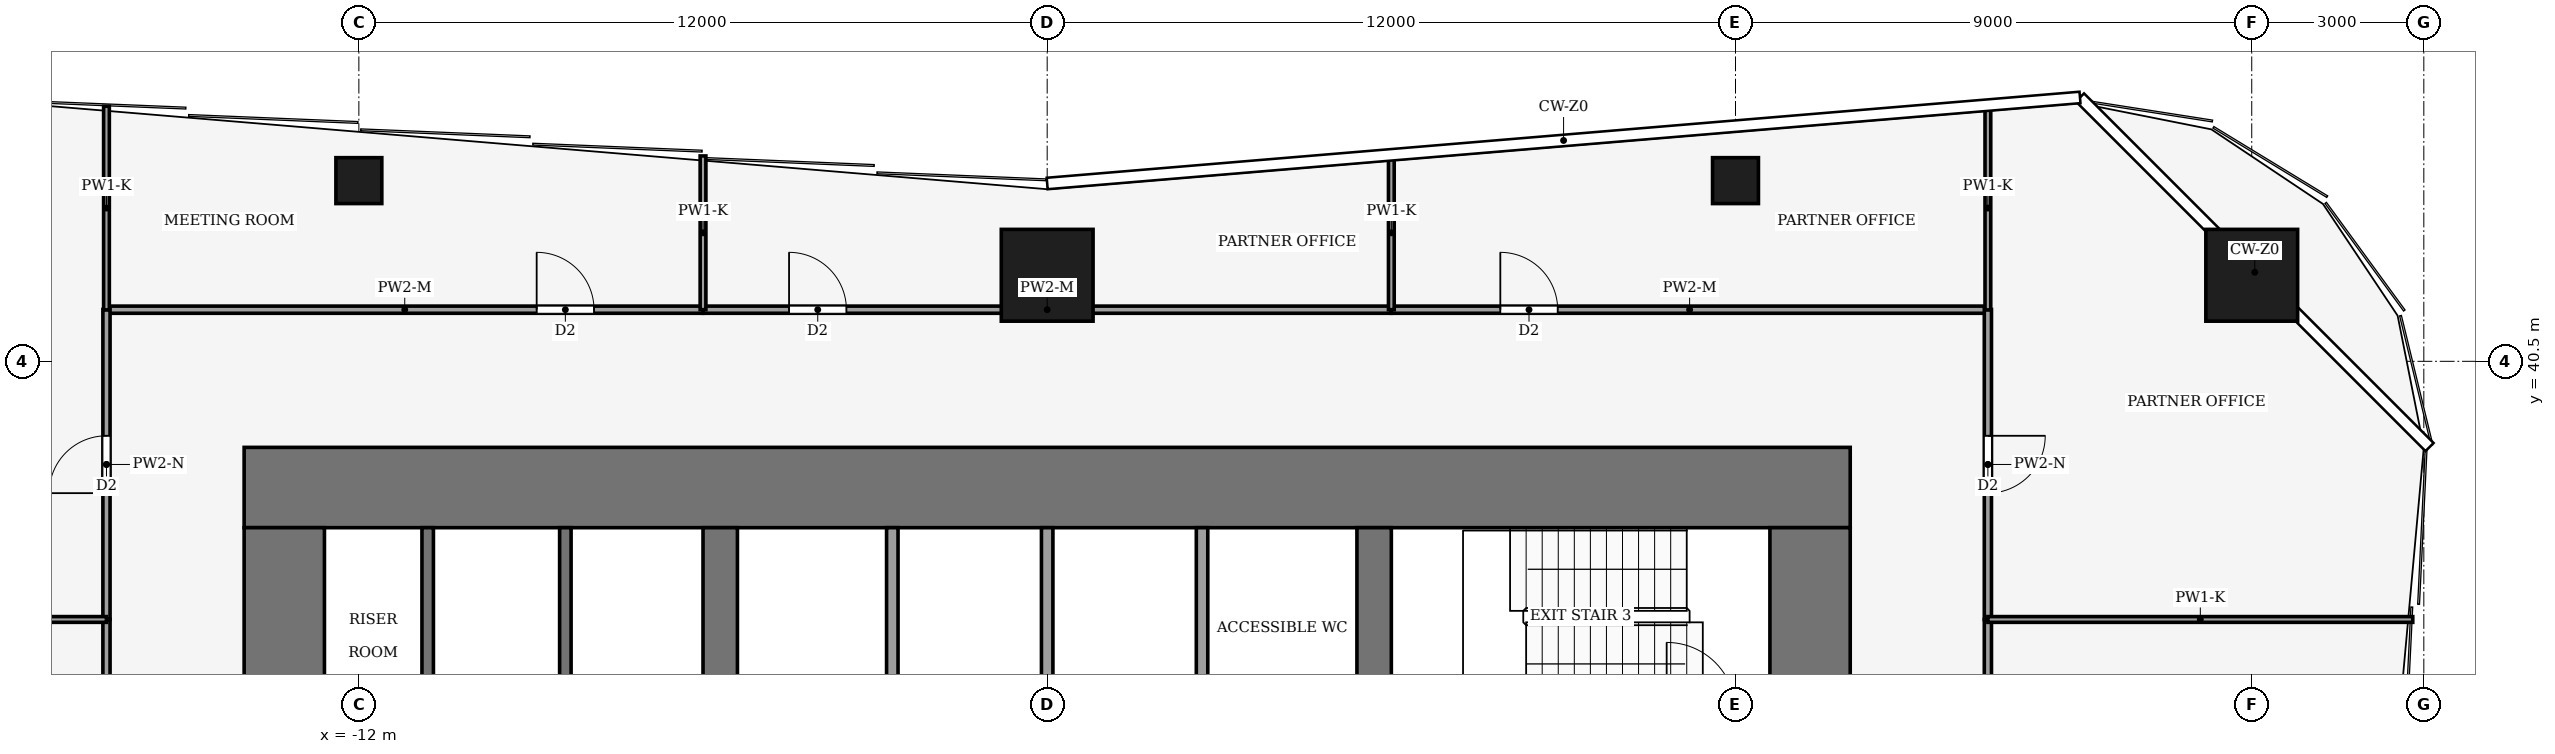
"""IFC4 building model, lengths in metres.
Left out: names, types, materials, properties, quantities, classifications, styles, units other than length and angle.
Written with IfcOpenShell. Run it as: python <this file> out.ifc"""

import sys

from ifc_helpers import new_model, si_unit, direction, frame, frame_2d, origin, origin_2d, place, context, subcontext, project, spatial, rectangle, hollow_rectangle, extrude, element, fill, save


model = new_model("IFC4")
c1 = context("Model", 3, precision=1e-05, world=origin(), true_north=direction((0.0, 1.0)))
c2 = subcontext(c1, "Body", "Model", "MODEL_VIEW")
j1 = project(units=[si_unit("LENGTHUNIT", "METRE"), si_unit("PLANEANGLEUNIT", "RADIAN")], contexts=[c1])
p1 = place(None, origin())
s1 = spatial("IfcSite", under=j1, at=p1, CompositionType="ELEMENT")
p2 = place(p1, origin())
s2 = spatial("IfcBuilding", under=s1, at=p2, CompositionType="ELEMENT")
p3 = place(p2, frame((0.0, 0.0, 54.0)))
s3 = spatial("IfcBuildingStorey", under=s2, at=p3, CompositionType="ELEMENT", Elevation=54.0)
p4 = place(p3, frame((-14.0, 38.3, -0.13), z_axis=(0.0, 0.0, 1.0), x_axis=(1.0, 0.0, 0.0)))
e1 = element("IfcWall", 1, at=p4, inside=s3, PredefinedType="SHEAR", context=c2, shape_type="SweptSolid", body=[
    extrude(rectangle(XDim=28.0, YDim=1.4, at=frame_2d((14.0, 0.0))), origin(), (0.0, 0.0, 1.0), 3.88),
])
p5 = place(p3, frame((-13.3, 18.4, -0.13), z_axis=(0.0, 0.0, 1.0), x_axis=(0.0, 1.0, 0.0)))
e2 = element("IfcWall", 2, at=p5, inside=s3, PredefinedType="SHEAR", context=c2, shape_type="SweptSolid", body=[
    extrude(rectangle(XDim=19.2, YDim=1.4, at=frame_2d((9.6, 0.0))), origin(), (0.0, 0.0, 1.0), 3.88),
])
p6 = place(p5, frame((2.8, 0.0, 0.13)))
e3 = element("IfcOpeningElement", 3, at=p6, cuts=e2, PredefinedType="OPENING", context=c2, shape_type="SweptSolid", body=[
    extrude(rectangle(XDim=2.4, YDim=2.4, at=frame_2d((1.2, 1.2))), frame((0.0, 0.71, 0.0), z_axis=(0.0, -1.0, 0.0), x_axis=(1.0, 0.0, 0.0)), (0.0, 0.0, 1.0), 1.42),
])
p7 = place(p5, frame((13.4, 0.0, 0.13)))
e4 = element("IfcOpeningElement", 4, at=p7, cuts=e2, PredefinedType="OPENING", context=c2, shape_type="SweptSolid", body=[
    extrude(rectangle(XDim=1.4, YDim=2.2, at=frame_2d((0.7, 1.1))), frame((0.0, 0.71, 0.0), z_axis=(0.0, -1.0, 0.0), x_axis=(1.0, 0.0, 0.0)), (0.0, 0.0, 1.0), 1.42),
])
p8 = place(p3, frame((13.3, 18.4, -0.13), z_axis=(0.0, 0.0, 1.0), x_axis=(0.0, 1.0, 0.0)))
e5 = element("IfcWall", 5, at=p8, inside=s3, PredefinedType="SHEAR", context=c2, shape_type="SweptSolid", body=[
    extrude(rectangle(XDim=19.2, YDim=1.4, at=frame_2d((9.6, 0.0))), origin(), (0.0, 0.0, 1.0), 3.88),
])
p9 = place(p8, frame((2.8, 0.0, 0.13)))
e6 = element("IfcOpeningElement", 6, at=p9, cuts=e5, PredefinedType="OPENING", context=c2, shape_type="SweptSolid", body=[
    extrude(rectangle(XDim=2.4, YDim=2.4, at=frame_2d((1.2, 1.2))), frame((0.0, 0.71, 0.0), z_axis=(0.0, -1.0, 0.0), x_axis=(1.0, 0.0, 0.0)), (0.0, 0.0, 1.0), 1.42),
])
p10 = place(p8, frame((13.3, 0.0, 0.13)))
e7 = element("IfcOpeningElement", 7, at=p10, cuts=e5, PredefinedType="OPENING", context=c2, shape_type="SweptSolid", body=[
    extrude(rectangle(XDim=2.4, YDim=2.4, at=frame_2d((1.2, 1.2))), frame((0.0, 0.71, 0.0), z_axis=(0.0, -1.0, 0.0), x_axis=(1.0, 0.0, 0.0)), (0.0, 0.0, 1.0), 1.42),
])
p11 = place(p3, frame((-5.7, 18.4, -0.13), z_axis=(0.0, 0.0, 1.0), x_axis=(0.0, 1.0, 0.0)))
e8 = element("IfcWall", 8, at=p11, inside=s3, PredefinedType="SHEAR", context=c2, shape_type="SweptSolid", body=[
    extrude(rectangle(XDim=19.2, YDim=0.6, at=frame_2d((9.6, 0.0))), origin(), (0.0, 0.0, 1.0), 3.88),
])
p12 = place(p11, frame((8.35, 0.0, 0.13)))
e9 = element("IfcOpeningElement", 9, at=p12, cuts=e8, PredefinedType="OPENING", context=c2, shape_type="SweptSolid", body=[
    extrude(rectangle(XDim=0.9, YDim=2.1, at=frame_2d((0.45, 1.05))), frame((0.0, 0.31, 0.0), z_axis=(0.0, -1.0, 0.0), x_axis=(1.0, 0.0, 0.0)), (0.0, 0.0, 1.0), 0.62),
])
p13 = place(p3, frame((5.7, 18.4, -0.13), z_axis=(0.0, 0.0, 1.0), x_axis=(0.0, 1.0, 0.0)))
e10 = element("IfcWall", 10, at=p13, inside=s3, PredefinedType="SHEAR", context=c2, shape_type="SweptSolid", body=[
    extrude(rectangle(XDim=19.2, YDim=0.6, at=frame_2d((9.6, 0.0))), origin(), (0.0, 0.0, 1.0), 3.88),
])
p14 = place(p13, frame((8.35, 0.0, 0.13)))
e11 = element("IfcOpeningElement", 11, at=p14, cuts=e10, PredefinedType="OPENING", context=c2, shape_type="SweptSolid", body=[
    extrude(rectangle(XDim=0.9, YDim=2.1, at=frame_2d((0.45, 1.05))), frame((0.0, 0.31, 0.0), z_axis=(0.0, -1.0, 0.0), x_axis=(1.0, 0.0, 0.0)), (0.0, 0.0, 1.0), 0.62),
])
p15 = place(p13, frame((13.3, 0.0, 0.13)))
e12 = element("IfcOpeningElement", 12, at=p15, cuts=e10, PredefinedType="OPENING", context=c2, shape_type="SweptSolid", body=[
    extrude(rectangle(XDim=2.4, YDim=2.4, at=frame_2d((1.2, 1.2))), frame((0.0, 0.31, 0.0), z_axis=(0.0, -1.0, 0.0), x_axis=(1.0, 0.0, 0.0)), (0.0, 0.0, 1.0), 0.62),
])
for number, where, z_axis, x_axis in (
    (13, (0.0, 42.0, 0.0), (0.0, 0.0, 1.0), (1.0, 0.0, 0.0)),
    (14, (21.0, 42.0, 0.0), (0.0, 0.0, 1.0), (1.0, 0.0, 0.0)),
):
    element("IfcColumn", number, at=place(p3, frame(where, z_axis=z_axis, x_axis=x_axis)), inside=s3, PredefinedType="COLUMN", context=c2, shape_type="SweptSolid", body=[
        extrude(hollow_rectangle(XDim=1.6, YDim=1.6, WallThickness=0.09, at=origin_2d()), origin(), (0.0, 0.0, 1.0), 4.0),
    ])
for number, where, z_axis, x_axis in (
    (15, (-12.0, 43.65, 0.0), (0.0, 0.0, 1.0), (1.0, 0.0, 0.0)),
    (16, (12.0, 43.65, 0.0), (0.0, 0.0, 1.0), (1.0, 0.0, 0.0)),
):
    element("IfcColumn", number, at=place(p3, frame(where, z_axis=z_axis, x_axis=x_axis)), inside=s3, PredefinedType="COLUMN", context=c2, shape_type="SweptSolid", body=[
        extrude(hollow_rectangle(XDim=0.8, YDim=0.8, WallThickness=0.04, at=origin_2d()), origin(), (0.0, 0.0, 1.0), 4.0),
    ])
for number, where, z_axis, x_axis in (
    (17, (-10.8, 34.0, 0.0), (0.0, 0.0, 1.0), (0.0, 1.0, 0.0)),
    (18, (-8.4, 34.0, 0.0), (0.0, 0.0, 1.0), (0.0, 1.0, 0.0)),
    (19, (-2.7, 34.0, 0.0), (0.0, 0.0, 1.0), (0.0, 1.0, 0.0)),
    (20, (0.0, 34.0, 0.0), (0.0, 0.0, 1.0), (0.0, 1.0, 0.0)),
    (21, (2.7, 34.0, 0.0), (0.0, 0.0, 1.0), (0.0, 1.0, 0.0)),
):
    element("IfcWall", number, at=place(p3, frame(where, z_axis=z_axis, x_axis=x_axis)), inside=s3, PredefinedType="PARTITIONING", context=c2, shape_type="SweptSolid", body=[
        extrude(rectangle(XDim=3.6, YDim=0.2, at=frame_2d((1.8, 0.0))), origin(), (0.0, 0.0, 1.0), 3.75),
    ])
p16 = place(p3, frame((-16.4, 41.4, 0.0), z_axis=(0.0, 0.0, 1.0), x_axis=(1.0, 0.0, 0.0)))
e22 = element("IfcWall", 22, at=p16, inside=s3, PredefinedType="PARTITIONING", context=c2, shape_type="SweptSolid", body=[
    extrude(rectangle(XDim=10.4, YDim=0.125, at=frame_2d((5.2, 0.0))), origin(), (0.0, 0.0, 1.0), 3.42),
])
p17 = place(p16, frame((7.5, 0.0, 0.0)))
e23 = element("IfcOpeningElement", 23, at=p17, cuts=e22, PredefinedType="OPENING", context=c2, shape_type="SweptSolid", body=[
    extrude(rectangle(XDim=1.0, YDim=2.1, at=frame_2d((0.5, 1.05))), frame((0.0, 0.073, 0.0), z_axis=(0.0, -1.0, 0.0), x_axis=(1.0, 0.0, 0.0)), (0.0, 0.0, 1.0), 0.145),
])
p18 = place(p3, frame((-6.0, 41.4, 0.0), z_axis=(0.0, 0.0, 1.0), x_axis=(1.0, 0.0, 0.0)))
e24 = element("IfcWall", 24, at=p18, inside=s3, PredefinedType="PARTITIONING", context=c2, shape_type="SweptSolid", body=[
    extrude(rectangle(XDim=12.0, YDim=0.125, at=frame_2d((6.0, 0.0))), origin(), (0.0, 0.0, 1.0), 3.42),
])
p19 = place(p18, frame((1.5, 0.0, 0.0)))
e25 = element("IfcOpeningElement", 25, at=p19, cuts=e24, PredefinedType="OPENING", context=c2, shape_type="SweptSolid", body=[
    extrude(rectangle(XDim=1.0, YDim=2.1, at=frame_2d((0.5, 1.05))), frame((0.0, 0.073, 0.0), z_axis=(0.0, -1.0, 0.0), x_axis=(1.0, 0.0, 0.0)), (0.0, 0.0, 1.0), 0.145),
])
p20 = place(p3, frame((6.0, 41.4, 0.0), z_axis=(0.0, 0.0, 1.0), x_axis=(1.0, 0.0, 0.0)))
e26 = element("IfcWall", 26, at=p20, inside=s3, PredefinedType="PARTITIONING", context=c2, shape_type="SweptSolid", body=[
    extrude(rectangle(XDim=10.4, YDim=0.125, at=frame_2d((5.2, 0.0))), origin(), (0.0, 0.0, 1.0), 3.42),
])
p21 = place(p20, frame((1.9, 0.0, 0.0)))
e27 = element("IfcOpeningElement", 27, at=p21, cuts=e26, PredefinedType="OPENING", context=c2, shape_type="SweptSolid", body=[
    extrude(rectangle(XDim=1.0, YDim=2.1, at=frame_2d((0.5, 1.05))), frame((0.0, 0.073, 0.0), z_axis=(0.0, -1.0, 0.0), x_axis=(1.0, 0.0, 0.0)), (0.0, 0.0, 1.0), 0.145),
])
p22 = place(p3, frame((-16.4, 27.0, 0.0), z_axis=(0.0, 0.0, 1.0), x_axis=(0.0, 1.0, 0.0)))
e28 = element("IfcWall", 28, at=p22, inside=s3, PredefinedType="PARTITIONING", context=c2, shape_type="SweptSolid", body=[
    extrude(rectangle(XDim=9.0, YDim=0.125, at=frame_2d((4.5, 0.0))), origin(), (0.0, 0.0, 1.0), 3.36),
])
p23 = place(p22, frame((4.0, 0.0, 0.0)))
e29 = element("IfcOpeningElement", 29, at=p23, cuts=e28, PredefinedType="OPENING", context=c2, shape_type="SweptSolid", body=[
    extrude(rectangle(XDim=1.0, YDim=2.1, at=frame_2d((0.5, 1.05))), frame((0.0, 0.073, 0.0), z_axis=(0.0, -1.0, 0.0), x_axis=(1.0, 0.0, 0.0)), (0.0, 0.0, 1.0), 0.145),
])
p24 = place(p3, frame((-16.4, 36.0, 0.0), z_axis=(0.0, 0.0, 1.0), x_axis=(0.0, 1.0, 0.0)))
e30 = element("IfcWall", 30, at=p24, inside=s3, PredefinedType="PARTITIONING", context=c2, shape_type="SweptSolid", body=[
    extrude(rectangle(XDim=5.404, YDim=0.125, at=frame_2d((2.702, 0.0))), origin(), (0.0, 0.0, 1.0), 3.02),
])
p25 = place(p24, frame((2.202, 0.0, 0.0)))
e31 = element("IfcOpeningElement", 31, at=p25, cuts=e30, PredefinedType="OPENING", context=c2, shape_type="SweptSolid", body=[
    extrude(rectangle(XDim=1.0, YDim=2.1, at=frame_2d((0.5, 1.05))), frame((0.0, 0.073, 0.0), z_axis=(0.0, -1.0, 0.0), x_axis=(1.0, 0.0, 0.0)), (0.0, 0.0, 1.0), 0.145),
])
p26 = place(p3, frame((16.4, 36.0, 0.0), z_axis=(0.0, 0.0, 1.0), x_axis=(0.0, -1.0, 0.0)))
e32 = element("IfcWall", 32, at=p26, inside=s3, PredefinedType="PARTITIONING", context=c2, shape_type="SweptSolid", body=[
    extrude(rectangle(XDim=9.0, YDim=0.125, at=frame_2d((4.5, 0.0))), origin(), (0.0, 0.0, 1.0), 3.36),
])
p27 = place(p26, frame((4.0, 0.0, 0.0)))
e33 = element("IfcOpeningElement", 33, at=p27, cuts=e32, PredefinedType="OPENING", context=c2, shape_type="SweptSolid", body=[
    extrude(rectangle(XDim=1.0, YDim=2.1, at=frame_2d((0.5, 1.05))), frame((0.0, 0.073, 0.0), z_axis=(0.0, -1.0, 0.0), x_axis=(1.0, 0.0, 0.0)), (0.0, 0.0, 1.0), 0.145),
])
p28 = place(p3, frame((16.4, 41.404, 0.0), z_axis=(0.0, 0.0, 1.0), x_axis=(0.0, -1.0, 0.0)))
e34 = element("IfcWall", 34, at=p28, inside=s3, PredefinedType="PARTITIONING", context=c2, shape_type="SweptSolid", body=[
    extrude(rectangle(XDim=5.404, YDim=0.125, at=frame_2d((2.702, 0.0))), origin(), (0.0, 0.0, 1.0), 3.02),
])
p29 = place(p28, frame((2.202, 0.0, 0.0)))
e35 = element("IfcOpeningElement", 35, at=p29, cuts=e34, PredefinedType="OPENING", context=c2, shape_type="SweptSolid", body=[
    extrude(rectangle(XDim=1.0, YDim=2.1, at=frame_2d((0.5, 1.05))), frame((0.0, 0.073, 0.0), z_axis=(0.0, -1.0, 0.0), x_axis=(1.0, 0.0, 0.0)), (0.0, 0.0, 1.0), 0.145),
])
p30 = place(p3, frame((-6.0, 41.4, 0.0), z_axis=(0.0, 0.0, 1.0), x_axis=(0.0, 1.0, 0.0)))
e36 = element("IfcWall", 36, at=p30, inside=s3, PredefinedType="PARTITIONING", context=c2, shape_type="SweptSolid", body=[
    extrude(rectangle(XDim=2.68, YDim=0.1, at=frame_2d((1.34, 0.0))), origin(), (0.0, 0.0, 1.0), 2.92),
])
p31 = place(p3, frame((-16.4, 44.947, 0.0), z_axis=(0.0, 0.0, 1.0), x_axis=(0.0, -1.0, 0.0)))
e37 = element("IfcWall", 37, at=p31, inside=s3, PredefinedType="PARTITIONING", context=c2, shape_type="SweptSolid", body=[
    extrude(rectangle(XDim=3.551, YDim=0.1, at=frame_2d((1.775, 0.0))), origin(), (0.0, 0.0, 1.0), 2.92),
])
p32 = place(p3, frame((6.0, 41.4, 0.0), z_axis=(0.0, 0.0, 1.0), x_axis=(0.0, 1.0, 0.0)))
e38 = element("IfcWall", 38, at=p32, inside=s3, PredefinedType="PARTITIONING", context=c2, shape_type="SweptSolid", body=[
    extrude(rectangle(XDim=2.68, YDim=0.1, at=frame_2d((1.34, 0.0))), origin(), (0.0, 0.0, 1.0), 2.92),
])
p33 = place(p3, frame((16.4, 41.396, 0.0), z_axis=(0.0, 0.0, 1.0), x_axis=(0.0, 1.0, 0.0)))
e39 = element("IfcWall", 39, at=p33, inside=s3, PredefinedType="PARTITIONING", context=c2, shape_type="SweptSolid", body=[
    extrude(rectangle(XDim=3.551, YDim=0.1, at=frame_2d((1.775, 0.0))), origin(), (0.0, 0.0, 1.0), 2.92),
])
for number, where, z_axis, x_axis in (
    (40, (-16.4, 36.0, 0.0), (0.0, 0.0, 1.0), (-1.0, 0.0, 0.0)),
    (41, (23.807, 36.0, 0.0), (0.0, 0.0, 1.0), (-1.0, 0.0, 0.0)),
):
    element("IfcWall", number, at=place(p3, frame(where, z_axis=z_axis, x_axis=x_axis)), inside=s3, PredefinedType="PARTITIONING", context=c2, shape_type="SweptSolid", body=[
        extrude(rectangle(XDim=7.407, YDim=0.1, at=frame_2d((3.704, 0.0))), origin(), (0.0, 0.0, 1.0), 2.92),
    ])
p34 = place(p17, origin())
e42 = element("IfcDoor", 42, at=p34, inside=s3, OperationType="SINGLE_SWING_RIGHT", PredefinedType="DOOR", context=c2, shape_type="SweptSolid", body=[
    extrude(rectangle(XDim=1.0, YDim=2.1, at=frame_2d((0.5, 1.05))), frame((0.0, 0.025, 0.0), z_axis=(0.0, -1.0, 0.0), x_axis=(1.0, 0.0, 0.0)), (0.0, 0.0, 1.0), 0.05),
])
fill(e23, e42)
p35 = place(p19, origin())
e43 = element("IfcDoor", 43, at=p35, inside=s3, OperationType="SINGLE_SWING_LEFT", PredefinedType="DOOR", context=c2, shape_type="SweptSolid", body=[
    extrude(rectangle(XDim=1.0, YDim=2.1, at=frame_2d((0.5, 1.05))), frame((0.0, 0.025, 0.0), z_axis=(0.0, -1.0, 0.0), x_axis=(1.0, 0.0, 0.0)), (0.0, 0.0, 1.0), 0.05),
])
fill(e25, e43)
p36 = place(p21, origin())
e44 = element("IfcDoor", 44, at=p36, inside=s3, OperationType="SINGLE_SWING_LEFT", PredefinedType="DOOR", context=c2, shape_type="SweptSolid", body=[
    extrude(rectangle(XDim=1.0, YDim=2.1, at=frame_2d((0.5, 1.05))), frame((0.0, 0.025, 0.0), z_axis=(0.0, -1.0, 0.0), x_axis=(1.0, 0.0, 0.0)), (0.0, 0.0, 1.0), 0.05),
])
fill(e27, e44)
p37 = place(p25, origin())
e45 = element("IfcDoor", 45, at=p37, inside=s3, OperationType="SINGLE_SWING_RIGHT", PredefinedType="DOOR", context=c2, shape_type="SweptSolid", body=[
    extrude(rectangle(XDim=1.0, YDim=2.1, at=frame_2d((0.5, 1.05))), frame((0.0, 0.025, 0.0), z_axis=(0.0, -1.0, 0.0), x_axis=(1.0, 0.0, 0.0)), (0.0, 0.0, 1.0), 0.05),
])
fill(e31, e45)
p38 = place(p29, origin())
e46 = element("IfcDoor", 46, at=p38, inside=s3, OperationType="SINGLE_SWING_RIGHT", PredefinedType="DOOR", context=c2, shape_type="SweptSolid", body=[
    extrude(rectangle(XDim=1.0, YDim=2.1, at=frame_2d((0.5, 1.05))), frame((0.0, 0.025, 0.0), z_axis=(0.0, -1.0, 0.0), x_axis=(1.0, 0.0, 0.0)), (0.0, 0.0, 1.0), 0.05),
])
fill(e35, e46)
save(model, sys.argv[1])
